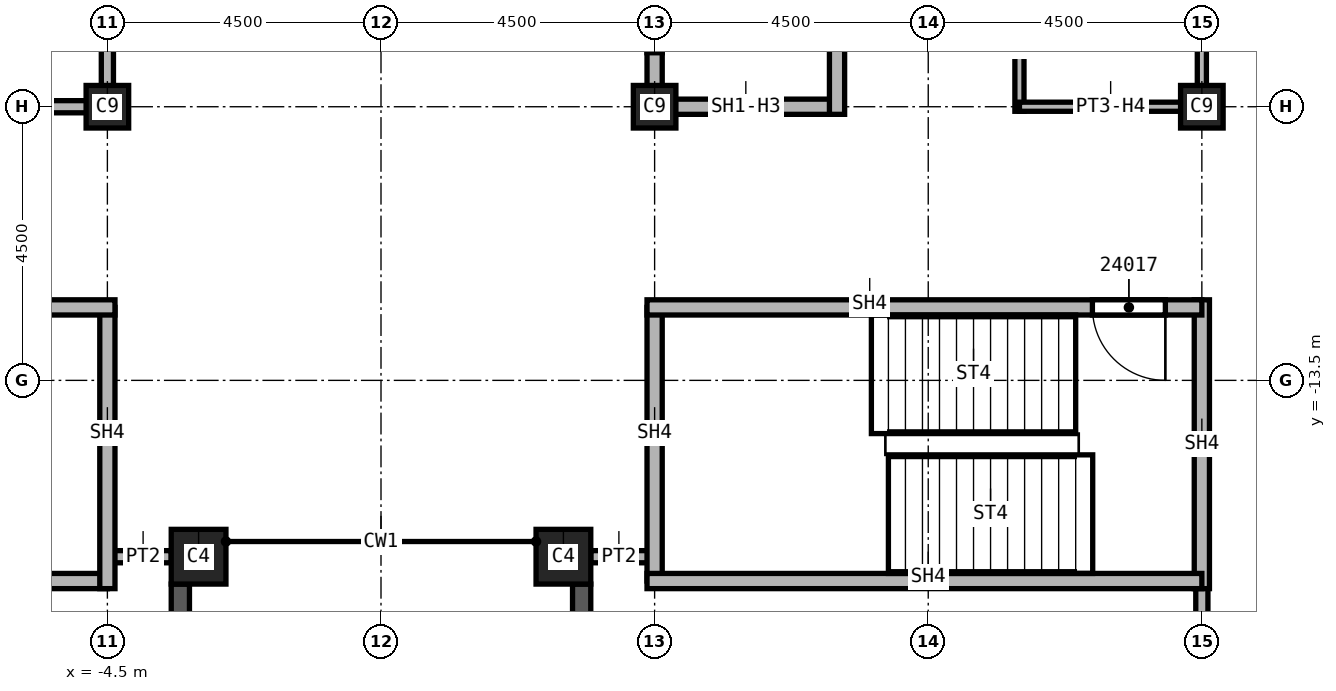
"""IFC4 building model, lengths in metres.
Left out: names, types, materials, properties, quantities, classifications, styles, units other than length and angle.
Written with IfcOpenShell. Run it as: python <this file> out.ifc"""

import sys

from ifc_helpers import new_model, si_unit, direction, frame, frame_2d, origin, origin_2d, place, context, subcontext, project, spatial, rectangle, extrude, element, fill, save


model = new_model("IFC4")
c1 = context("Model", 3, precision=1e-05, world=origin(), true_north=direction((0.0, 1.0)))
c2 = subcontext(c1, "Body", "Model", "MODEL_VIEW")
j1 = project(units=[si_unit("LENGTHUNIT", "METRE"), si_unit("PLANEANGLEUNIT", "RADIAN")], contexts=[c1])
p1 = place(None, origin())
s1 = spatial("IfcSite", under=j1, at=p1, CompositionType="ELEMENT")
p2 = place(p1, origin())
s2 = spatial("IfcBuilding", under=s1, at=p2, CompositionType="ELEMENT")
p3 = place(p2, frame((0.0, 0.0, 338.0)))
s3 = spatial("IfcBuildingStorey", under=s2, at=p3, CompositionType="ELEMENT", Elevation=338.0)
for number, where, z_axis, x_axis in (
    (1, (4.5, -9.0, 0.0), (0.0, 0.0, 1.0), (1.0, 0.0, 0.0)),
    (2, (13.5, -9.0, 0.0), (0.0, 0.0, 1.0), (1.0, 0.0, 0.0)),
    (3, (-4.5, -9.0, 0.0), (0.0, 0.0, 1.0), (1.0, 0.0, 0.0)),
):
    element("IfcColumn", number, at=place(p3, frame(where, z_axis=z_axis, x_axis=x_axis)), inside=s3, PredefinedType="COLUMN", context=c2, shape_type="SweptSolid", body=[
        extrude(rectangle(XDim=0.7, YDim=0.7, at=origin_2d()), origin(), (0.0, 0.0, 1.0), 3.74),
    ])
for number, where, z_axis, x_axis in (
    (4, (3.0, -16.4, 0.0), (0.0, 0.0, 1.0), (1.0, 0.0, 0.0)),
    (5, (-3.0, -16.4, 0.0), (0.0, 0.0, 1.0), (1.0, 0.0, 0.0)),
):
    element("IfcColumn", number, at=place(p3, frame(where, z_axis=z_axis, x_axis=x_axis)), inside=s3, PredefinedType="COLUMN", context=c2, shape_type="SweptSolid", body=[
        extrude(rectangle(XDim=0.9, YDim=0.9, at=origin_2d()), origin(), (0.0, 0.0, 1.0), 3.74),
    ])
p4 = place(p3, frame((-3.3, -24.95, 0.0), z_axis=(0.0, 0.0, 1.0), x_axis=(0.0, 1.0, 0.0)))
e6 = element("IfcWall", 6, at=p4, inside=s3, PredefinedType="SOLIDWALL", context=c2, shape_type="SweptSolid", body=[
    extrude(rectangle(XDim=8.1, YDim=0.3, at=frame_2d((4.05, 0.0))), origin(), (0.0, 0.0, 1.0), 3.14),
])
p5 = place(p4, frame((0.825, 0.0, 0.8)))
e7 = element("IfcOpeningElement", 7, at=p5, cuts=e6, PredefinedType="OPENING", context=c2, shape_type="SweptSolid", body=[
    extrude(rectangle(XDim=2.4, YDim=1.95, at=frame_2d((1.2, 0.975))), frame((0.0, 0.15, 0.0), z_axis=(0.0, -1.0, 0.0), x_axis=(1.0, 0.0, 0.0)), (0.0, 0.0, 1.0), 0.3),
])
p6 = place(p4, frame((4.875, 0.0, 0.8)))
e8 = element("IfcOpeningElement", 8, at=p6, cuts=e6, PredefinedType="OPENING", context=c2, shape_type="SweptSolid", body=[
    extrude(rectangle(XDim=2.4, YDim=1.95, at=frame_2d((1.2, 0.975))), frame((0.0, 0.15, 0.0), z_axis=(0.0, -1.0, 0.0), x_axis=(1.0, 0.0, 0.0)), (0.0, 0.0, 1.0), 0.3),
])
p7 = place(p3, frame((3.3, -16.85, 0.0), z_axis=(0.0, 0.0, 1.0), x_axis=(0.0, -1.0, 0.0)))
e9 = element("IfcWall", 9, at=p7, inside=s3, PredefinedType="SOLIDWALL", context=c2, shape_type="SweptSolid", body=[
    extrude(rectangle(XDim=8.1, YDim=0.3, at=frame_2d((4.05, 0.0))), origin(), (0.0, 0.0, 1.0), 3.14),
])
p8 = place(p7, frame((0.825, 0.0, 0.8)))
e10 = element("IfcOpeningElement", 10, at=p8, cuts=e9, PredefinedType="OPENING", context=c2, shape_type="SweptSolid", body=[
    extrude(rectangle(XDim=2.4, YDim=1.95, at=frame_2d((1.2, 0.975))), frame((0.0, 0.15, 0.0), z_axis=(0.0, -1.0, 0.0), x_axis=(1.0, 0.0, 0.0)), (0.0, 0.0, 1.0), 0.3),
])
p9 = place(p7, frame((4.875, 0.0, 0.8)))
e11 = element("IfcOpeningElement", 11, at=p9, cuts=e9, PredefinedType="OPENING", context=c2, shape_type="SweptSolid", body=[
    extrude(rectangle(XDim=2.4, YDim=1.95, at=frame_2d((1.2, 0.975))), frame((0.0, 0.15, 0.0), z_axis=(0.0, -1.0, 0.0), x_axis=(1.0, 0.0, 0.0)), (0.0, 0.0, 1.0), 0.3),
])
for number, where, z_axis, x_axis in (
    (12, (-3.45, -16.4, 0.0), (0.0, 0.0, 1.0), (-1.0, 0.0, 0.0)),
    (13, (4.5, -16.4, 0.0), (0.0, 0.0, 1.0), (-1.0, 0.0, 0.0)),
):
    element("IfcWall", number, at=place(p3, frame(where, z_axis=z_axis, x_axis=x_axis)), inside=s3, PredefinedType="PARTITIONING", context=c2, shape_type="SweptSolid", body=[
        extrude(rectangle(XDim=1.05, YDim=0.2, at=frame_2d((0.525, 0.0))), origin(), (0.0, 0.0, 1.0), 3.74),
    ])
p10 = place(p3, frame((13.5, -24.95, 0.0), z_axis=(0.0, 0.0, 1.0), x_axis=(0.0, 1.0, 0.0)))
e14 = element("IfcWall", 14, at=p10, inside=s3, PredefinedType="PARTITIONING", context=c2, shape_type="SweptSolid", body=[
    extrude(rectangle(XDim=8.275, YDim=0.2, at=frame_2d((4.137, 0.0))), origin(), (0.0, 0.0, 1.0), 3.74),
])
p11 = place(p10, frame((1.0, 0.0, 0.0)))
e15 = element("IfcOpeningElement", 15, at=p11, cuts=e14, PredefinedType="OPENING", context=c2, shape_type="SweptSolid", body=[
    extrude(rectangle(XDim=1.0, YDim=2.1, at=frame_2d((0.5, 1.05))), frame((0.0, 0.1, 0.0), z_axis=(0.0, -1.0, 0.0), x_axis=(1.0, 0.0, 0.0)), (0.0, 0.0, 1.0), 0.2),
])
p12 = place(p3, frame((-4.5, -9.0, 0.0), z_axis=(0.0, 0.0, 1.0), x_axis=(-1.0, 0.0, 0.0)))
e16 = element("IfcWall", 16, at=p12, inside=s3, PredefinedType="SOLIDWALL", context=c2, shape_type="SweptSolid", body=[
    extrude(rectangle(XDim=3.0, YDim=0.2, at=frame_2d((1.5, 0.0))), origin(), (0.0, 0.0, 1.0), 3.062),
])
p13 = place(p3, frame((-4.5, 6.0, 0.0), z_axis=(0.0, 0.0, 1.0), x_axis=(0.0, -1.0, 0.0)))
e17 = element("IfcWall", 17, at=p13, inside=s3, PredefinedType="SOLIDWALL", context=c2, shape_type="SweptSolid", body=[
    extrude(rectangle(XDim=15.1, YDim=0.2, at=frame_2d((7.55, 0.0))), origin(), (0.0, 0.0, 1.0), 3.062),
])
p14 = place(p13, frame((9.25, 0.0, 0.0)))
e18 = element("IfcOpeningElement", 18, at=p14, cuts=e17, PredefinedType="OPENING", context=c2, shape_type="SweptSolid", body=[
    extrude(rectangle(XDim=1.1, YDim=2.1, at=frame_2d((0.55, 1.05))), frame((0.0, 0.1, 0.0), z_axis=(0.0, -1.0, 0.0), x_axis=(1.0, 0.0, 0.0)), (0.0, 0.0, 1.0), 0.2),
])
p15 = place(p13, frame((6.85, 0.0, 0.0)))
e19 = element("IfcOpeningElement", 19, at=p15, cuts=e17, PredefinedType="OPENING", context=c2, shape_type="SweptSolid", body=[
    extrude(rectangle(XDim=1.1, YDim=2.1, at=frame_2d((0.55, 1.05))), frame((0.0, 0.1, 0.0), z_axis=(0.0, -1.0, 0.0), x_axis=(1.0, 0.0, 0.0)), (0.0, 0.0, 1.0), 0.2),
])
p16 = place(p3, frame((4.5, -9.125, 0.0), z_axis=(0.0, 0.0, 1.0), x_axis=(0.0, 1.0, 0.0)))
e20 = element("IfcWall", 20, at=p16, inside=s3, PredefinedType="SOLIDWALL", context=c2, shape_type="SweptSolid", body=[
    extrude(rectangle(XDim=3.125, YDim=0.25, at=frame_2d((1.562, 0.0))), origin(), (0.0, 0.0, 1.0), 3.062),
])
p17 = place(p16, frame((1.012, 0.0, 0.0)))
e21 = element("IfcOpeningElement", 21, at=p17, cuts=e20, PredefinedType="OPENING", context=c2, shape_type="SweptSolid", body=[
    extrude(rectangle(XDim=1.1, YDim=2.1, at=frame_2d((0.55, 1.05))), frame((0.0, 0.125, 0.0), z_axis=(0.0, -1.0, 0.0), x_axis=(1.0, 0.0, 0.0)), (0.0, 0.0, 1.0), 0.25),
])
p18 = place(p3, frame((7.5, -9.0, 0.0), z_axis=(0.0, 0.0, 1.0), x_axis=(-1.0, 0.0, 0.0)))
e22 = element("IfcWall", 22, at=p18, inside=s3, PredefinedType="SOLIDWALL", context=c2, shape_type="SweptSolid", body=[
    extrude(rectangle(XDim=3.0, YDim=0.25, at=frame_2d((1.5, 0.0))), origin(), (0.0, 0.0, 1.0), 3.062),
])
p19 = place(p3, frame((7.5, -6.0, 0.0), z_axis=(0.0, 0.0, 1.0), x_axis=(0.0, -1.0, 0.0)))
e23 = element("IfcWall", 23, at=p19, inside=s3, PredefinedType="SOLIDWALL", context=c2, shape_type="SweptSolid", body=[
    extrude(rectangle(XDim=3.125, YDim=0.25, at=frame_2d((1.562, 0.0))), origin(), (0.0, 0.0, 1.0), 3.74),
])
p20 = place(p3, frame((-4.5, -16.8, 0.0), z_axis=(0.0, 0.0, 1.0), x_axis=(-1.0, 0.0, 0.0)))
e24 = element("IfcWall", 24, at=p20, inside=s3, PredefinedType="SOLIDWALL", context=c2, shape_type="SweptSolid", body=[
    extrude(rectangle(XDim=9.0, YDim=0.25, at=frame_2d((4.5, 0.0))), origin(), (0.0, 0.0, 1.0), 3.74),
])
p21 = place(p3, frame((-4.5, -12.3, 0.0), z_axis=(0.0, 0.0, 1.0), x_axis=(0.0, -1.0, 0.0)))
e25 = element("IfcWall", 25, at=p21, inside=s3, PredefinedType="SOLIDWALL", context=c2, shape_type="SweptSolid", body=[
    extrude(rectangle(XDim=4.625, YDim=0.25, at=frame_2d((2.312, 0.0))), origin(), (0.0, 0.0, 1.0), 3.74),
])
p22 = place(p3, frame((-4.375, -12.3, 0.0), z_axis=(0.0, 0.0, 1.0), x_axis=(-1.0, 0.0, 0.0)))
e26 = element("IfcWall", 26, at=p22, inside=s3, PredefinedType="SOLIDWALL", context=c2, shape_type="SweptSolid", body=[
    extrude(rectangle(XDim=9.125, YDim=0.25, at=frame_2d((4.562, 0.0))), origin(), (0.0, 0.0, 1.0), 3.74),
])
p23 = place(p22, frame((7.2, 0.0, 0.0)))
e27 = element("IfcOpeningElement", 27, at=p23, cuts=e26, PredefinedType="OPENING", context=c2, shape_type="SweptSolid", body=[
    extrude(rectangle(XDim=1.2, YDim=2.1, at=frame_2d((0.6, 1.05))), frame((0.0, 0.125, 0.0), z_axis=(0.0, -1.0, 0.0), x_axis=(1.0, 0.0, 0.0)), (0.0, 0.0, 1.0), 0.25),
])
p24 = place(p3, frame((4.5, -16.8, 0.0), z_axis=(0.0, 0.0, 1.0), x_axis=(0.0, 1.0, 0.0)))
e28 = element("IfcWall", 28, at=p24, inside=s3, PredefinedType="SOLIDWALL", context=c2, shape_type="SweptSolid", body=[
    extrude(rectangle(XDim=4.5, YDim=0.25, at=frame_2d((2.25, 0.0))), origin(), (0.0, 0.0, 1.0), 3.74),
])
p25 = place(p3, frame((13.5, -16.925, 0.0), z_axis=(0.0, 0.0, 1.0), x_axis=(0.0, 1.0, 0.0)))
e29 = element("IfcWall", 29, at=p25, inside=s3, PredefinedType="SOLIDWALL", context=c2, shape_type="SweptSolid", body=[
    extrude(rectangle(XDim=4.75, YDim=0.25, at=frame_2d((2.375, 0.0))), origin(), (0.0, 0.0, 1.0), 3.74),
])
p26 = place(p3, frame((13.5, -16.8, 0.0), z_axis=(0.0, 0.0, 1.0), x_axis=(-1.0, 0.0, 0.0)))
e30 = element("IfcWall", 30, at=p26, inside=s3, PredefinedType="SOLIDWALL", context=c2, shape_type="SweptSolid", body=[
    extrude(rectangle(XDim=9.125, YDim=0.25, at=frame_2d((4.562, 0.0))), origin(), (0.0, 0.0, 1.0), 3.74),
])
p27 = place(p3, frame((13.5, -12.3, 0.0), z_axis=(0.0, 0.0, 1.0), x_axis=(-1.0, 0.0, 0.0)))
e31 = element("IfcWall", 31, at=p27, inside=s3, PredefinedType="SOLIDWALL", context=c2, shape_type="SweptSolid", body=[
    extrude(rectangle(XDim=9.125, YDim=0.25, at=frame_2d((4.562, 0.0))), origin(), (0.0, 0.0, 1.0), 3.74),
])
p28 = place(p27, frame((0.6, 0.0, 0.0)))
e32 = element("IfcOpeningElement", 32, at=p28, cuts=e31, PredefinedType="OPENING", context=c2, shape_type="SweptSolid", body=[
    extrude(rectangle(XDim=1.2, YDim=2.1, at=frame_2d((0.6, 1.05))), frame((0.0, 0.125, 0.0), z_axis=(0.0, -1.0, 0.0), x_axis=(1.0, 0.0, 0.0)), (0.0, 0.0, 1.0), 0.25),
])
p29 = place(p3, frame((10.5, -5.925, 0.0), z_axis=(0.0, 0.0, 1.0), x_axis=(0.0, -1.0, 0.0)))
e33 = element("IfcWall", 33, at=p29, inside=s3, PredefinedType="PARTITIONING", context=c2, shape_type="SweptSolid", body=[
    extrude(rectangle(XDim=3.15, YDim=0.15, at=frame_2d((1.575, 0.0))), origin(), (0.0, 0.0, 1.0), 3.74),
])
p30 = place(p29, frame((0.25, 0.0, 0.0)))
e34 = element("IfcOpeningElement", 34, at=p30, cuts=e33, PredefinedType="OPENING", context=c2, shape_type="SweptSolid", body=[
    extrude(rectangle(XDim=0.9, YDim=2.1, at=frame_2d((0.45, 1.05))), frame((0.0, 0.075, 0.0), z_axis=(0.0, -1.0, 0.0), x_axis=(1.0, 0.0, 0.0)), (0.0, 0.0, 1.0), 0.15),
])
p31 = place(p3, frame((13.5, -9.0, 0.0), z_axis=(0.0, 0.0, 1.0), x_axis=(-1.0, 0.0, 0.0)))
e35 = element("IfcWall", 35, at=p31, inside=s3, PredefinedType="PARTITIONING", context=c2, shape_type="SweptSolid", body=[
    extrude(rectangle(XDim=3.0, YDim=0.15, at=frame_2d((1.5, 0.0))), origin(), (0.0, 0.0, 1.0), 3.062),
])
p32 = place(p3, frame((13.5, -6.0, 0.0), z_axis=(0.0, 0.0, 1.0), x_axis=(0.0, -1.0, 0.0)))
e36 = element("IfcWall", 36, at=p32, inside=s3, PredefinedType="PARTITIONING", context=c2, shape_type="SweptSolid", body=[
    extrude(rectangle(XDim=3.075, YDim=0.15, at=frame_2d((1.538, 0.0))), origin(), (0.0, 0.0, 1.0), 3.062),
])
p33 = place(p28, origin())
e37 = element("IfcDoor", 37, at=p33, inside=s3, OperationType="SINGLE_SWING_RIGHT", PredefinedType="DOOR", context=c2, shape_type="SweptSolid", body=[
    extrude(rectangle(XDim=1.2, YDim=2.1, at=frame_2d((0.6, 1.05))), frame((0.0, 0.025, 0.0), z_axis=(0.0, -1.0, 0.0), x_axis=(1.0, 0.0, 0.0)), (0.0, 0.0, 1.0), 0.05),
])
fill(e32, e37)
p34 = place(p17, origin())
e38 = element("IfcDoor", 38, at=p34, inside=s3, OperationType="SLIDING_TO_LEFT", PredefinedType="DOOR", context=c2, shape_type="SweptSolid", body=[
    extrude(rectangle(XDim=1.1, YDim=2.1, at=frame_2d((0.55, 1.05))), frame((0.0, 0.025, 0.0), z_axis=(0.0, -1.0, 0.0), x_axis=(1.0, 0.0, 0.0)), (0.0, 0.0, 1.0), 0.05),
])
fill(e21, e38)
save(model, sys.argv[1])
